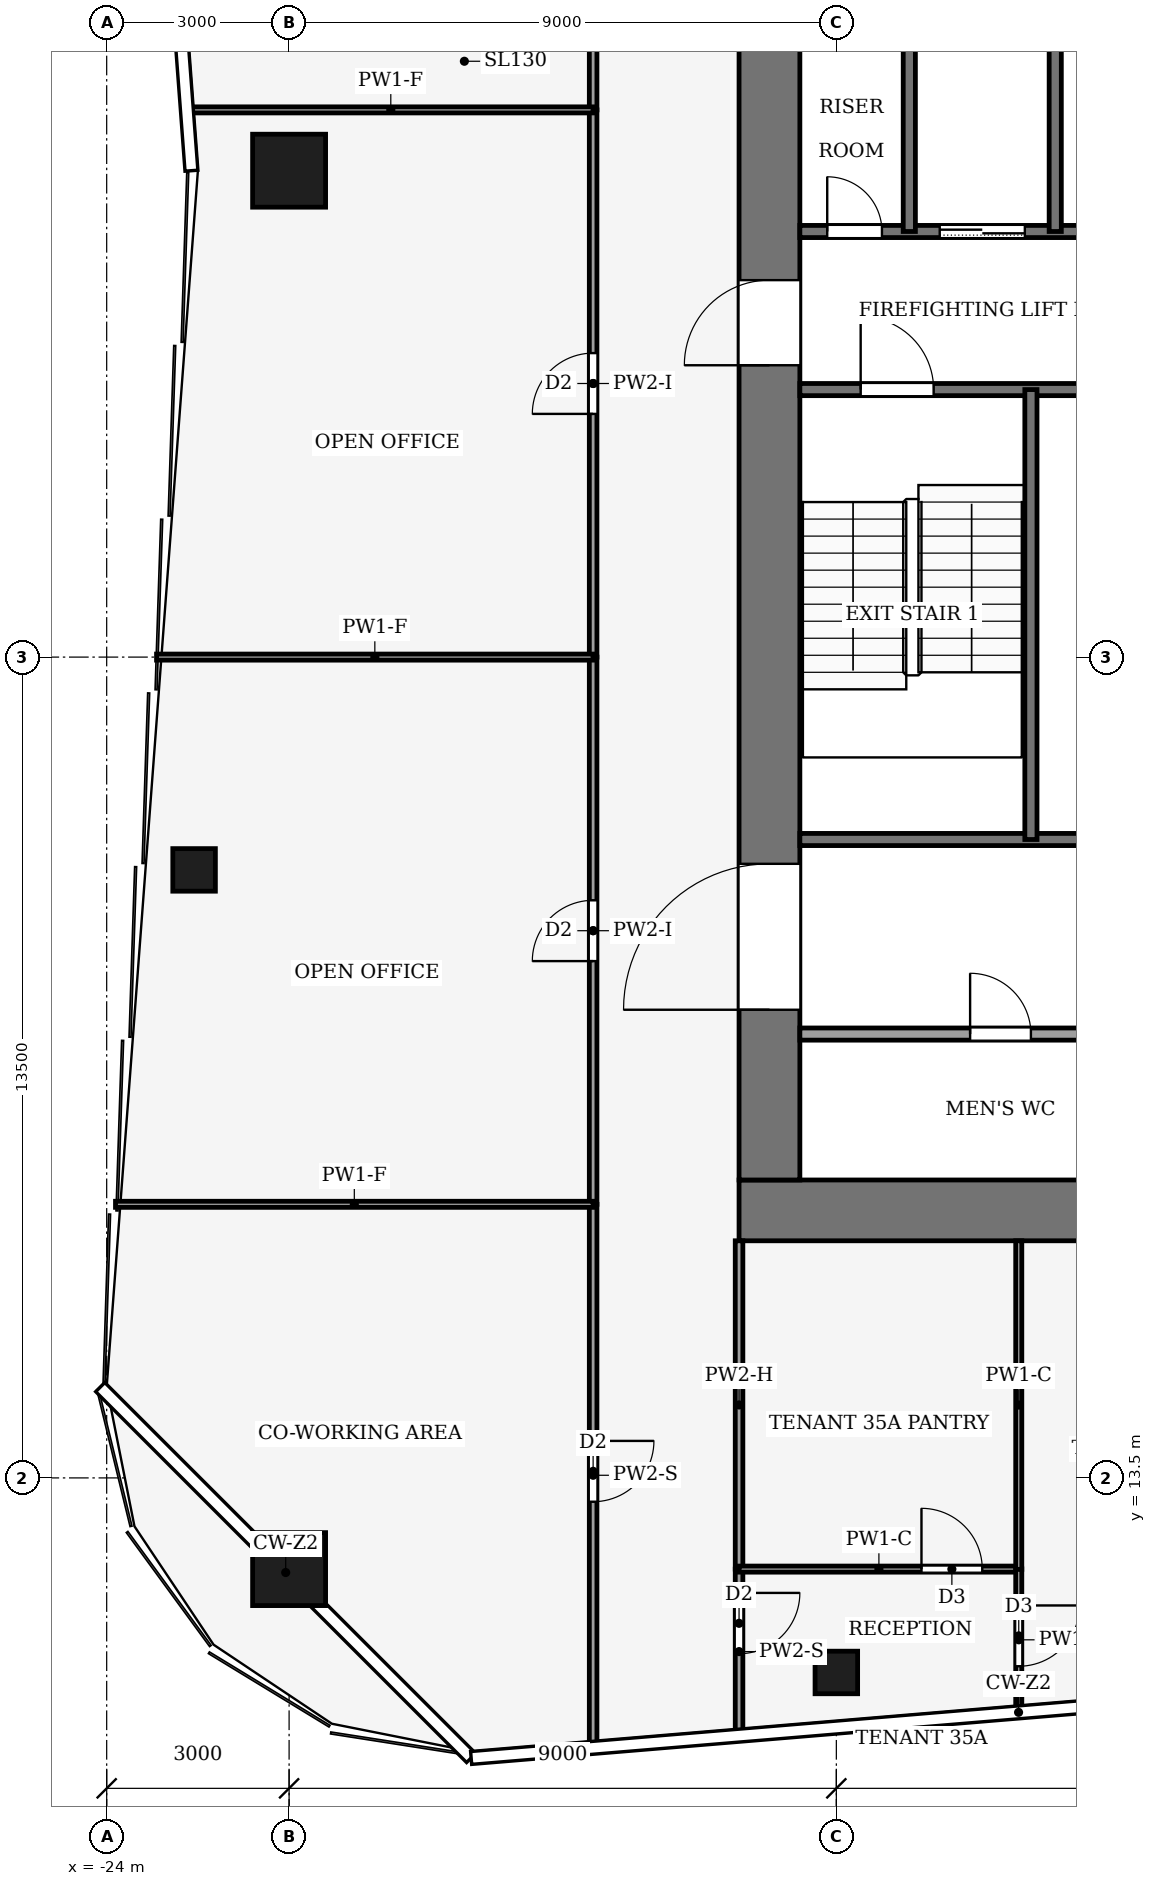
"""IFC4 building model, lengths in metres.
Left out: names, types, materials, properties, quantities, classifications, styles, units other than length and angle.
Written with IfcOpenShell. Run it as: python <this file> out.ifc"""

import sys

from ifc_helpers import new_model, si_unit, direction, frame, frame_2d, origin, origin_2d, place, context, subcontext, project, spatial, rectangle, hollow_rectangle, extrude, element, fill, save


model = new_model("IFC4")
c1 = context("Model", 3, precision=1e-05, world=origin(), true_north=direction((0.0, 1.0)))
c2 = subcontext(c1, "Body", "Model", "MODEL_VIEW")
j1 = project(units=[si_unit("LENGTHUNIT", "METRE"), si_unit("PLANEANGLEUNIT", "RADIAN")], contexts=[c1])
p1 = place(None, origin())
s1 = spatial("IfcSite", under=j1, at=p1, CompositionType="ELEMENT")
p2 = place(p1, origin())
s2 = spatial("IfcBuilding", under=s1, at=p2, CompositionType="ELEMENT")
p3 = place(p2, frame((0.0, 0.0, 154.0)))
s3 = spatial("IfcBuildingStorey", under=s2, at=p3, CompositionType="ELEMENT", Elevation=154.0)
p4 = place(p3, frame((-13.6, 17.9, -0.13), z_axis=(0.0, 0.0, 1.0), x_axis=(1.0, 0.0, 0.0)))
e1 = element("IfcWall", 1, at=p4, inside=s3, PredefinedType="SHEAR", context=c2, shape_type="SweptSolid", body=[
    extrude(rectangle(XDim=27.2, YDim=1.0, at=frame_2d((13.6, 0.0))), origin(), (0.0, 0.0, 1.0), 4.0),
])
p5 = place(p3, frame((-13.1, 18.4, -0.13), z_axis=(0.0, 0.0, 1.0), x_axis=(0.0, 1.0, 0.0)))
e2 = element("IfcWall", 2, at=p5, inside=s3, PredefinedType="SHEAR", context=c2, shape_type="SweptSolid", body=[
    extrude(rectangle(XDim=19.2, YDim=1.0, at=frame_2d((9.6, 0.0))), origin(), (0.0, 0.0, 1.0), 4.0),
])
p6 = place(p5, frame((2.8, 0.0, 0.13)))
e3 = element("IfcOpeningElement", 3, at=p6, cuts=e2, PredefinedType="OPENING", context=c2, shape_type="SweptSolid", body=[
    extrude(rectangle(XDim=2.4, YDim=2.4, at=frame_2d((1.2, 1.2))), frame((0.0, 0.51, 0.0), z_axis=(0.0, -1.0, 0.0), x_axis=(1.0, 0.0, 0.0)), (0.0, 0.0, 1.0), 1.02),
])
p7 = place(p5, frame((13.4, 0.0, 0.13)))
e4 = element("IfcOpeningElement", 4, at=p7, cuts=e2, PredefinedType="OPENING", context=c2, shape_type="SweptSolid", body=[
    extrude(rectangle(XDim=1.4, YDim=2.2, at=frame_2d((0.7, 1.1))), frame((0.0, 0.51, 0.0), z_axis=(0.0, -1.0, 0.0), x_axis=(1.0, 0.0, 0.0)), (0.0, 0.0, 1.0), 1.02),
])
for number, where, z_axis, x_axis in (
    (5, (-21.0, 12.0, 0.0), (0.0, 0.0, 1.0), (1.0, 0.0, 0.0)),
    (6, (-21.0, 35.0, 0.0), (0.0, 0.0, 1.0), (1.0, 0.0, 0.0)),
):
    element("IfcColumn", number, at=place(p3, frame(where, z_axis=z_axis, x_axis=x_axis)), inside=s3, PredefinedType="COLUMN", context=c2, shape_type="SweptSolid", body=[
        extrude(hollow_rectangle(XDim=1.2, YDim=1.2, WallThickness=0.07, at=origin_2d()), origin(), (0.0, 0.0, 1.0), 4.0),
    ])
for number, where, z_axis, x_axis in (
    (7, (-12.0, 10.3, 0.0), (0.0, 0.0, 1.0), (1.0, 0.0, 0.0)),
    (8, (-22.562, 23.5, 0.0), (0.0, 0.0, 1.0), (1.0, 0.0, 0.0)),
):
    element("IfcColumn", number, at=place(p3, frame(where, z_axis=z_axis, x_axis=x_axis)), inside=s3, PredefinedType="COLUMN", context=c2, shape_type="SweptSolid", body=[
        extrude(hollow_rectangle(XDim=0.7, YDim=0.7, WallThickness=0.03, at=origin_2d()), origin(), (0.0, 0.0, 1.0), 4.0),
    ])
p8 = place(p3, frame((-12.6, 20.8, 0.0), z_axis=(0.0, 0.0, 1.0), x_axis=(1.0, 0.0, 0.0)))
e9 = element("IfcWall", 9, at=p8, inside=s3, PredefinedType="PARTITIONING", context=c2, shape_type="SweptSolid", body=[
    extrude(rectangle(XDim=6.6, YDim=0.2, at=frame_2d((3.3, 0.0))), origin(), (0.0, 0.0, 1.0), 3.87),
])
p9 = place(p8, frame((2.8, 0.0, 0.0)))
e10 = element("IfcOpeningElement", 10, at=p9, cuts=e9, PredefinedType="OPENING", context=c2, shape_type="SweptSolid", body=[
    extrude(rectangle(XDim=1.0, YDim=2.1, at=frame_2d((0.5, 1.05))), frame((0.0, 0.11, 0.0), z_axis=(0.0, -1.0, 0.0), x_axis=(1.0, 0.0, 0.0)), (0.0, 0.0, 1.0), 0.22),
])
p10 = place(p3, frame((-12.6, 24.0, 0.0), z_axis=(0.0, 0.0, 1.0), x_axis=(1.0, 0.0, 0.0)))
e11 = element("IfcWall", 11, at=p10, inside=s3, PredefinedType="PARTITIONING", context=c2, shape_type="SweptSolid", body=[
    extrude(rectangle(XDim=6.6, YDim=0.2, at=frame_2d((3.3, 0.0))), origin(), (0.0, 0.0, 1.0), 3.87),
])
p11 = place(p10, frame((4.7, 0.0, 0.0)))
e12 = element("IfcOpeningElement", 12, at=p11, cuts=e11, PredefinedType="OPENING", context=c2, shape_type="SweptSolid", body=[
    extrude(rectangle(XDim=1.0, YDim=2.1, at=frame_2d((0.5, 1.05))), frame((0.0, 0.11, 0.0), z_axis=(0.0, -1.0, 0.0), x_axis=(1.0, 0.0, 0.0)), (0.0, 0.0, 1.0), 0.22),
])
p12 = place(p3, frame((-12.6, 31.4, 0.0), z_axis=(0.0, 0.0, 1.0), x_axis=(1.0, 0.0, 0.0)))
e13 = element("IfcWall", 13, at=p12, inside=s3, PredefinedType="PARTITIONING", context=c2, shape_type="SweptSolid", body=[
    extrude(rectangle(XDim=6.6, YDim=0.2, at=frame_2d((3.3, 0.0))), origin(), (0.0, 0.0, 1.0), 3.87),
])
p13 = place(p12, frame((1.0, 0.0, 0.0)))
e14 = element("IfcOpeningElement", 14, at=p13, cuts=e13, PredefinedType="OPENING", context=c2, shape_type="SweptSolid", body=[
    extrude(rectangle(XDim=1.2, YDim=2.2, at=frame_2d((0.6, 1.1))), frame((0.0, 0.11, 0.0), z_axis=(0.0, -1.0, 0.0), x_axis=(1.0, 0.0, 0.0)), (0.0, 0.0, 1.0), 0.22),
])
p14 = place(p3, frame((-12.6, 34.0, 0.0), z_axis=(0.0, 0.0, 1.0), x_axis=(1.0, 0.0, 0.0)))
e15 = element("IfcWall", 15, at=p14, inside=s3, PredefinedType="PARTITIONING", context=c2, shape_type="SweptSolid", body=[
    extrude(rectangle(XDim=6.6, YDim=0.2, at=frame_2d((3.3, 0.0))), origin(), (0.0, 0.0, 1.0), 3.87),
])
p15 = place(p14, frame((4.7, 0.0, 0.0)))
e16 = element("IfcOpeningElement", 16, at=p15, cuts=e15, PredefinedType="OPENING", context=c2, shape_type="SweptSolid", body=[
    extrude(rectangle(XDim=1.4, YDim=2.2, at=frame_2d((0.7, 1.1))), frame((0.0, 0.11, 0.0), z_axis=(0.0, -1.0, 0.0), x_axis=(1.0, 0.0, 0.0)), (0.0, 0.0, 1.0), 0.22),
])
p16 = place(p14, frame((2.3, 0.0, 0.0)))
e17 = element("IfcOpeningElement", 17, at=p16, cuts=e15, PredefinedType="OPENING", context=c2, shape_type="SweptSolid", body=[
    extrude(rectangle(XDim=1.4, YDim=2.2, at=frame_2d((0.7, 1.1))), frame((0.0, 0.11, 0.0), z_axis=(0.0, -1.0, 0.0), x_axis=(1.0, 0.0, 0.0)), (0.0, 0.0, 1.0), 0.22),
])
p17 = place(p14, frame((0.45, 0.0, 0.0)))
e18 = element("IfcOpeningElement", 18, at=p17, cuts=e15, PredefinedType="OPENING", context=c2, shape_type="SweptSolid", body=[
    extrude(rectangle(XDim=0.9, YDim=2.1, at=frame_2d((0.45, 1.05))), frame((0.0, 0.11, 0.0), z_axis=(0.0, -1.0, 0.0), x_axis=(1.0, 0.0, 0.0)), (0.0, 0.0, 1.0), 0.22),
])
p18 = place(p3, frame((-10.8, 34.0, 0.0), z_axis=(0.0, 0.0, 1.0), x_axis=(0.0, 1.0, 0.0)))
e19 = element("IfcWall", 19, at=p18, inside=s3, PredefinedType="PARTITIONING", context=c2, shape_type="SweptSolid", body=[
    extrude(rectangle(XDim=3.6, YDim=0.2, at=frame_2d((1.8, 0.0))), origin(), (0.0, 0.0, 1.0), 3.87),
])
p19 = place(p3, frame((-8.8, 24.0, 0.0), z_axis=(0.0, 0.0, 1.0), x_axis=(0.0, 1.0, 0.0)))
e20 = element("IfcWall", 20, at=p19, inside=s3, PredefinedType="PARTITIONING", context=c2, shape_type="SweptSolid", body=[
    extrude(rectangle(XDim=7.4, YDim=0.2, at=frame_2d((3.7, 0.0))), origin(), (0.0, 0.0, 1.0), 3.87),
])
p20 = place(p3, frame((-8.4, 34.0, 0.0), z_axis=(0.0, 0.0, 1.0), x_axis=(0.0, 1.0, 0.0)))
e21 = element("IfcWall", 21, at=p20, inside=s3, PredefinedType="PARTITIONING", context=c2, shape_type="SweptSolid", body=[
    extrude(rectangle(XDim=3.6, YDim=0.2, at=frame_2d((1.8, 0.0))), origin(), (0.0, 0.0, 1.0), 3.87),
])
p21 = place(p3, frame((-16.0, 18.0, 0.0), z_axis=(0.0, 0.0, 1.0), x_axis=(0.0, -1.0, 0.0)))
e22 = element("IfcWall", 22, at=p21, inside=s3, PredefinedType="PARTITIONING", context=c2, shape_type="SweptSolid", body=[
    extrude(rectangle(XDim=8.913, YDim=0.125, at=frame_2d((4.457, 0.0))), origin(), (0.0, 0.0, 1.0), 3.04),
])
p22 = place(p21, frame((3.892, 0.0, 0.0)))
e23 = element("IfcOpeningElement", 23, at=p22, cuts=e22, PredefinedType="OPENING", context=c2, shape_type="SweptSolid", body=[
    extrude(rectangle(XDim=1.0, YDim=2.1, at=frame_2d((0.5, 1.05))), frame((0.0, 0.073, 0.0), z_axis=(0.0, -1.0, 0.0), x_axis=(1.0, 0.0, 0.0)), (0.0, 0.0, 1.0), 0.145),
])
p23 = place(p3, frame((-16.0, 18.0, 0.0), z_axis=(0.0, 0.0, 1.0), x_axis=(0.0, 1.0, 0.0)))
e24 = element("IfcWall", 24, at=p23, inside=s3, PredefinedType="PARTITIONING", context=c2, shape_type="SweptSolid", body=[
    extrude(rectangle(XDim=9.0, YDim=0.125, at=frame_2d((4.5, 0.0))), origin(), (0.0, 0.0, 1.0), 3.48),
])
p24 = place(p23, frame((4.0, 0.0, 0.0)))
e25 = element("IfcOpeningElement", 25, at=p24, cuts=e24, PredefinedType="OPENING", context=c2, shape_type="SweptSolid", body=[
    extrude(rectangle(XDim=1.0, YDim=2.1, at=frame_2d((0.5, 1.05))), frame((0.0, 0.073, 0.0), z_axis=(0.0, -1.0, 0.0), x_axis=(1.0, 0.0, 0.0)), (0.0, 0.0, 1.0), 0.145),
])
p25 = place(p3, frame((-16.0, 27.0, 0.0), z_axis=(0.0, 0.0, 1.0), x_axis=(0.0, 1.0, 0.0)))
e26 = element("IfcWall", 26, at=p25, inside=s3, PredefinedType="PARTITIONING", context=c2, shape_type="SweptSolid", body=[
    extrude(rectangle(XDim=9.0, YDim=0.125, at=frame_2d((4.5, 0.0))), origin(), (0.0, 0.0, 1.0), 3.48),
])
p26 = place(p25, frame((4.0, 0.0, 0.0)))
e27 = element("IfcOpeningElement", 27, at=p26, cuts=e26, PredefinedType="OPENING", context=c2, shape_type="SweptSolid", body=[
    extrude(rectangle(XDim=1.0, YDim=2.1, at=frame_2d((0.5, 1.05))), frame((0.0, 0.073, 0.0), z_axis=(0.0, -1.0, 0.0), x_axis=(1.0, 0.0, 0.0)), (0.0, 0.0, 1.0), 0.145),
])
p27 = place(p3, frame((-16.0, 41.004, 0.0), z_axis=(0.0, 0.0, 1.0), x_axis=(0.0, -1.0, 0.0)))
e28 = element("IfcWall", 28, at=p27, inside=s3, PredefinedType="PARTITIONING", context=c2, shape_type="SweptSolid", body=[
    extrude(rectangle(XDim=5.004, YDim=0.125, at=frame_2d((2.502, 0.0))), origin(), (0.0, 0.0, 1.0), 3.14),
])
p28 = place(p27, frame((1.602, 0.0, 0.0)))
e29 = element("IfcOpeningElement", 29, at=p28, cuts=e28, PredefinedType="OPENING", context=c2, shape_type="SweptSolid", body=[
    extrude(rectangle(XDim=1.8, YDim=2.1, at=frame_2d((0.9, 1.05))), frame((0.0, 0.073, 0.0), z_axis=(0.0, -1.0, 0.0), x_axis=(1.0, 0.0, 0.0)), (0.0, 0.0, 1.0), 0.145),
])
p29 = place(p3, frame((-13.6, 12.0, 0.0), z_axis=(0.0, 0.0, 1.0), x_axis=(0.0, -1.0, 0.0)))
e30 = element("IfcWall", 30, at=p29, inside=s3, PredefinedType="PARTITIONING", context=c2, shape_type="SweptSolid", body=[
    extrude(rectangle(XDim=2.713, YDim=0.125, at=frame_2d((1.357, 0.0))), origin(), (0.0, 0.0, 1.0), 3.04),
])
p30 = place(p29, frame((0.392, 0.0, 0.0)))
e31 = element("IfcOpeningElement", 31, at=p30, cuts=e30, PredefinedType="OPENING", context=c2, shape_type="SweptSolid", body=[
    extrude(rectangle(XDim=1.0, YDim=2.1, at=frame_2d((0.5, 1.05))), frame((0.0, 0.073, 0.0), z_axis=(0.0, -1.0, 0.0), x_axis=(1.0, 0.0, 0.0)), (0.0, 0.0, 1.0), 0.145),
])
p31 = place(p3, frame((-13.6, 12.0, 0.0), z_axis=(0.0, 0.0, 1.0), x_axis=(0.0, 1.0, 0.0)))
e32 = element("IfcWall", 32, at=p31, inside=s3, PredefinedType="PARTITIONING", context=c2, shape_type="SweptSolid", body=[
    extrude(rectangle(XDim=5.4, YDim=0.125, at=frame_2d((2.7, 0.0))), origin(), (0.0, 0.0, 1.0), 3.14),
])
p32 = place(p3, frame((-16.0, 18.0, 0.0), z_axis=(0.0, 0.0, 1.0), x_axis=(-1.0, 0.0, 0.0)))
e33 = element("IfcWall", 33, at=p32, inside=s3, PredefinedType="PARTITIONING", context=c2, shape_type="SweptSolid", body=[
    extrude(rectangle(XDim=7.855, YDim=0.1, at=frame_2d((3.927, 0.0))), origin(), (0.0, 0.0, 1.0), 3.04),
])
p33 = place(p3, frame((-16.0, 27.0, 0.0), z_axis=(0.0, 0.0, 1.0), x_axis=(-1.0, 0.0, 0.0)))
e34 = element("IfcWall", 34, at=p33, inside=s3, PredefinedType="PARTITIONING", context=c2, shape_type="SweptSolid", body=[
    extrude(rectangle(XDim=7.18, YDim=0.1, at=frame_2d((3.59, 0.0))), origin(), (0.0, 0.0, 1.0), 3.04),
])
p34 = place(p3, frame((-16.0, 36.0, 0.0), z_axis=(0.0, 0.0, 1.0), x_axis=(-1.0, 0.0, 0.0)))
e35 = element("IfcWall", 35, at=p34, inside=s3, PredefinedType="PARTITIONING", context=c2, shape_type="SweptSolid", body=[
    extrude(rectangle(XDim=6.655, YDim=0.1, at=frame_2d((3.328, 0.0))), origin(), (0.0, 0.0, 1.0), 3.04),
])
p35 = place(p3, frame((-13.6, 12.0, 0.0), z_axis=(0.0, 0.0, 1.0), x_axis=(1.0, 0.0, 0.0)))
e36 = element("IfcWall", 36, at=p35, inside=s3, PredefinedType="PARTITIONING", context=c2, shape_type="SweptSolid", body=[
    extrude(rectangle(XDim=4.6, YDim=0.1, at=frame_2d((2.3, 0.0))), origin(), (0.0, 0.0, 1.0), 3.87),
])
p36 = place(p35, frame((3.0, 0.0, 0.0)))
e37 = element("IfcOpeningElement", 37, at=p36, cuts=e36, PredefinedType="OPENING", context=c2, shape_type="SweptSolid", body=[
    extrude(rectangle(XDim=1.0, YDim=2.1, at=frame_2d((0.5, 1.05))), frame((0.0, 0.06, 0.0), z_axis=(0.0, -1.0, 0.0), x_axis=(1.0, 0.0, 0.0)), (0.0, 0.0, 1.0), 0.12),
])
p37 = place(p3, frame((-9.0, 12.004, 0.0), z_axis=(0.0, 0.0, 1.0), x_axis=(0.0, -1.0, 0.0)))
e38 = element("IfcWall", 38, at=p37, inside=s3, PredefinedType="PARTITIONING", context=c2, shape_type="SweptSolid", body=[
    extrude(rectangle(XDim=2.334, YDim=0.1, at=frame_2d((1.167, 0.0))), origin(), (0.0, 0.0, 1.0), 3.04),
])
p38 = place(p37, frame((0.602, 0.0, 0.0)))
e39 = element("IfcOpeningElement", 39, at=p38, cuts=e38, PredefinedType="OPENING", context=c2, shape_type="SweptSolid", body=[
    extrude(rectangle(XDim=1.0, YDim=2.1, at=frame_2d((0.5, 1.05))), frame((0.0, 0.06, 0.0), z_axis=(0.0, -1.0, 0.0), x_axis=(1.0, 0.0, 0.0)), (0.0, 0.0, 1.0), 0.12),
])
p39 = place(p3, frame((-9.0, 11.996, 0.0), z_axis=(0.0, 0.0, 1.0), x_axis=(0.0, 1.0, 0.0)))
e40 = element("IfcWall", 40, at=p39, inside=s3, PredefinedType="PARTITIONING", context=c2, shape_type="SweptSolid", body=[
    extrude(rectangle(XDim=5.404, YDim=0.1, at=frame_2d((2.702, 0.0))), origin(), (0.0, 0.0, 1.0), 3.87),
])
p40 = place(p16, origin())
e41 = element("IfcDoor", 41, at=p40, inside=s3, OperationType="SLIDING_TO_LEFT", PredefinedType="DOOR", context=c2, shape_type="SweptSolid", body=[
    extrude(rectangle(XDim=1.4, YDim=2.2, at=frame_2d((0.7, 1.1))), frame((0.0, 0.025, 0.0), z_axis=(0.0, -1.0, 0.0), x_axis=(1.0, 0.0, 0.0)), (0.0, 0.0, 1.0), 0.05),
])
fill(e17, e41)
p41 = place(p17, origin())
e42 = element("IfcDoor", 42, at=p41, inside=s3, OperationType="SINGLE_SWING_RIGHT", PredefinedType="DOOR", context=c2, shape_type="SweptSolid", body=[
    extrude(rectangle(XDim=0.9, YDim=2.1, at=frame_2d((0.45, 1.05))), frame((0.0, 0.025, 0.0), z_axis=(0.0, -1.0, 0.0), x_axis=(1.0, 0.0, 0.0)), (0.0, 0.0, 1.0), 0.05),
])
fill(e18, e42)
p42 = place(p9, origin())
e43 = element("IfcDoor", 43, at=p42, inside=s3, OperationType="SINGLE_SWING_LEFT", PredefinedType="DOOR", context=c2, shape_type="SweptSolid", body=[
    extrude(rectangle(XDim=1.0, YDim=2.1, at=frame_2d((0.5, 1.05))), frame((0.0, 0.025, 0.0), z_axis=(0.0, -1.0, 0.0), x_axis=(1.0, 0.0, 0.0)), (0.0, 0.0, 1.0), 0.05),
])
fill(e10, e43)
p43 = place(p13, origin())
e44 = element("IfcDoor", 44, at=p43, inside=s3, OperationType="SINGLE_SWING_RIGHT", PredefinedType="DOOR", context=c2, shape_type="SweptSolid", body=[
    extrude(rectangle(XDim=1.2, YDim=2.2, at=frame_2d((0.6, 1.1))), frame((0.0, 0.025, 0.0), z_axis=(0.0, -1.0, 0.0), x_axis=(1.0, 0.0, 0.0)), (0.0, 0.0, 1.0), 0.05),
])
fill(e14, e44)
p44 = place(p6, origin())
e45 = element("IfcDoor", 45, at=p44, inside=s3, OperationType="DOUBLE_DOOR_SINGLE_SWING", PredefinedType="DOOR", context=c2, shape_type="SweptSolid", body=[
    extrude(rectangle(XDim=2.4, YDim=2.4, at=frame_2d((1.2, 1.2))), frame((0.0, 0.025, 0.0), z_axis=(0.0, -1.0, 0.0), x_axis=(1.0, 0.0, 0.0)), (0.0, 0.0, 1.0), 0.05),
])
fill(e3, e45)
p45 = place(p7, origin())
e46 = element("IfcDoor", 46, at=p45, inside=s3, OperationType="SINGLE_SWING_RIGHT", PredefinedType="DOOR", context=c2, shape_type="SweptSolid", body=[
    extrude(rectangle(XDim=1.4, YDim=2.2, at=frame_2d((0.7, 1.1))), frame((0.0, 0.025, 0.0), z_axis=(0.0, -1.0, 0.0), x_axis=(1.0, 0.0, 0.0)), (0.0, 0.0, 1.0), 0.05),
])
fill(e4, e46)
p46 = place(p22, origin())
e47 = element("IfcDoor", 47, at=p46, inside=s3, OperationType="SINGLE_SWING_LEFT", PredefinedType="DOOR", context=c2, shape_type="SweptSolid", body=[
    extrude(rectangle(XDim=1.0, YDim=2.1, at=frame_2d((0.5, 1.05))), frame((0.0, 0.025, 0.0), z_axis=(0.0, -1.0, 0.0), x_axis=(1.0, 0.0, 0.0)), (0.0, 0.0, 1.0), 0.05),
])
fill(e23, e47)
p47 = place(p24, origin())
e48 = element("IfcDoor", 48, at=p47, inside=s3, OperationType="SINGLE_SWING_RIGHT", PredefinedType="DOOR", context=c2, shape_type="SweptSolid", body=[
    extrude(rectangle(XDim=1.0, YDim=2.1, at=frame_2d((0.5, 1.05))), frame((0.0, 0.025, 0.0), z_axis=(0.0, -1.0, 0.0), x_axis=(1.0, 0.0, 0.0)), (0.0, 0.0, 1.0), 0.05),
])
fill(e25, e48)
p48 = place(p26, origin())
e49 = element("IfcDoor", 49, at=p48, inside=s3, OperationType="SINGLE_SWING_LEFT", PredefinedType="DOOR", context=c2, shape_type="SweptSolid", body=[
    extrude(rectangle(XDim=1.0, YDim=2.1, at=frame_2d((0.5, 1.05))), frame((0.0, 0.025, 0.0), z_axis=(0.0, -1.0, 0.0), x_axis=(1.0, 0.0, 0.0)), (0.0, 0.0, 1.0), 0.05),
])
fill(e27, e49)
p49 = place(p30, origin())
e50 = element("IfcDoor", 50, at=p49, inside=s3, OperationType="SINGLE_SWING_LEFT", PredefinedType="DOOR", context=c2, shape_type="SweptSolid", body=[
    extrude(rectangle(XDim=1.0, YDim=2.1, at=frame_2d((0.5, 1.05))), frame((0.0, 0.025, 0.0), z_axis=(0.0, -1.0, 0.0), x_axis=(1.0, 0.0, 0.0)), (0.0, 0.0, 1.0), 0.05),
])
fill(e31, e50)
p50 = place(p36, origin())
e51 = element("IfcDoor", 51, at=p50, inside=s3, OperationType="SINGLE_SWING_RIGHT", PredefinedType="DOOR", context=c2, shape_type="SweptSolid", body=[
    extrude(rectangle(XDim=1.0, YDim=2.1, at=frame_2d((0.5, 1.05))), frame((0.0, 0.025, 0.0), z_axis=(0.0, -1.0, 0.0), x_axis=(1.0, 0.0, 0.0)), (0.0, 0.0, 1.0), 0.05),
])
fill(e37, e51)
p51 = place(p38, origin())
e52 = element("IfcDoor", 52, at=p51, inside=s3, OperationType="SINGLE_SWING_LEFT", PredefinedType="DOOR", context=c2, shape_type="SweptSolid", body=[
    extrude(rectangle(XDim=1.0, YDim=2.1, at=frame_2d((0.5, 1.05))), frame((0.0, 0.025, 0.0), z_axis=(0.0, -1.0, 0.0), x_axis=(1.0, 0.0, 0.0)), (0.0, 0.0, 1.0), 0.05),
])
fill(e39, e52)
save(model, sys.argv[1])
